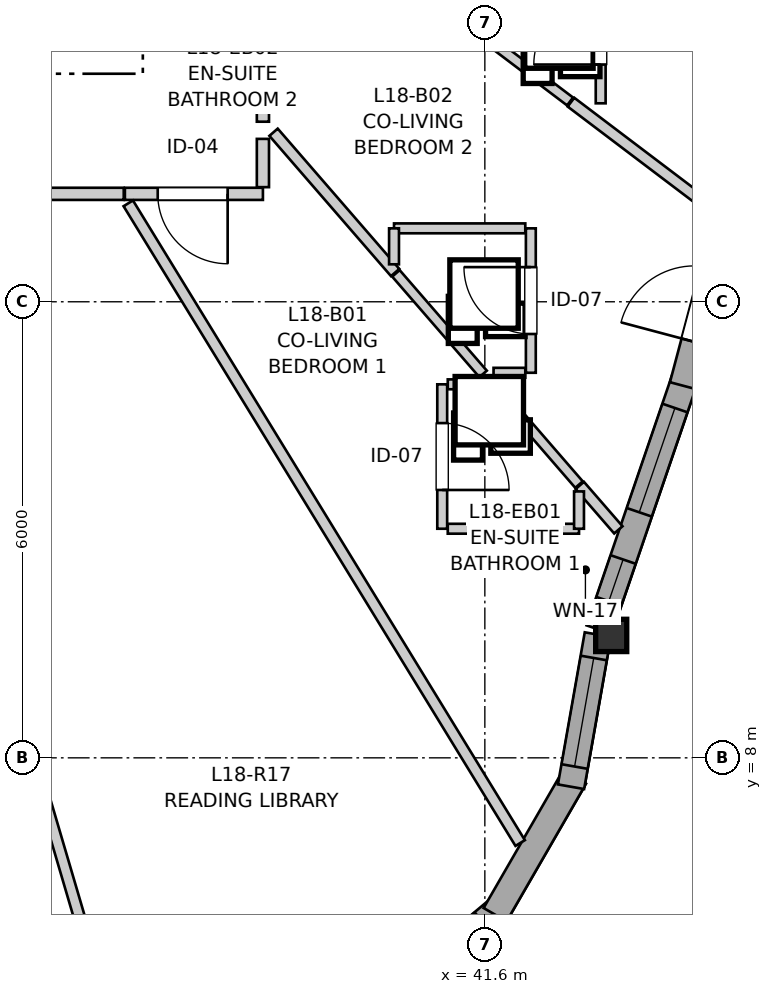
"""IFC4 building model, lengths in metres.
Left out: names, types, materials, properties, quantities, classifications, styles, units other than length and angle.
Written with IfcOpenShell. Run it as: python <this file> out.ifc"""

import sys

from ifc_helpers import new_model, si_unit, direction, frame, frame_2d, origin, origin_2d, place, context, subcontext, project, spatial, rectangle, i_section, extrude, source, transform, mapped, element, fill, save


model = new_model("IFC4")
c1 = context("Model", 3, precision=1e-05, world=origin(), true_north=direction((0.0, 1.0)))
c2 = subcontext(c1, "Body", "Model", "MODEL_VIEW")
j1 = project(units=[si_unit("LENGTHUNIT", "METRE"), si_unit("PLANEANGLEUNIT", "RADIAN")], contexts=[c1])
p1 = place(None, origin())
s1 = spatial("IfcSite", under=j1, at=p1, CompositionType="ELEMENT")
p2 = place(p1, origin())
s2 = spatial("IfcBuilding", under=s1, at=p2, CompositionType="ELEMENT")
p3 = place(p2, frame((0.0, 0.0, 62.2)))
s3 = spatial("IfcBuildingStorey", under=s2, at=p3, CompositionType="ELEMENT", Elevation=62.2)
m1 = source(origin(), c2, "Body", "SweptSolid", [
    extrude(i_section(OverallWidth=0.409, OverallDepth=0.425, WebThickness=0.03, FlangeThickness=0.048, FilletRadius=0.015, at=origin_2d()), origin(), (0.0, 0.0, 1.0), 2.9),
])
p4 = place(p3, frame((43.262, 9.611, 0.0), z_axis=(0.0, 0.0, 1.0), x_axis=(1.0, 0.0, 0.0)))
e1 = element("IfcColumn", 1, at=p4, inside=s3, PredefinedType="PILASTER", context=c2, shape_type="MappedRepresentation", body=[
    mapped(m1, transform((0.0, 0.0, 0.0), x_axis=(1.0, 0.0, 0.0), y_axis=(0.0, 1.0, 0.0), z_axis=(0.0, 0.0, 1.0), scale=1.0)),
])
p5 = place(p3, frame((40.221, 4.697, 0.0), z_axis=(0.0, 0.0, 1.0), x_axis=(0.766024572719, 0.642811289563, 0.0)))
e2 = element("IfcWall", 2, at=p5, inside=s3, PredefinedType="SOLIDWALL", context=c2, shape_type="SweptSolid", body=[
    extrude(rectangle(XDim=2.09, YDim=0.35, at=frame_2d((1.045, 0.0))), origin(), (0.0, 0.0, 1.0), 2.38),
])
p6 = place(p5, frame((0.32, 0.0, 0.82)))
e3 = element("IfcOpeningElement", 3, at=p6, cuts=e2, PredefinedType="OPENING", context=c2, shape_type="SweptSolid", body=[
    extrude(rectangle(XDim=1.45, YDim=1.25, at=frame_2d((0.725, 0.625))), frame((0.0, 0.185, 0.0), z_axis=(0.0, -1.0, 0.0), x_axis=(1.0, 0.0, 0.0)), (0.0, 0.0, 1.0), 0.37),
])
p7 = place(p3, frame((41.735, 5.937, 0.0), z_axis=(0.0, 0.0, 1.0), x_axis=(0.49990781971, 0.866078617559, 0.0)))
e4 = element("IfcWall", 4, at=p7, inside=s3, PredefinedType="SOLIDWALL", context=c2, shape_type="SweptSolid", body=[
    extrude(rectangle(XDim=2.09, YDim=0.35, at=frame_2d((1.045, 0.0))), origin(), (0.0, 0.0, 1.0), 2.38),
])
p8 = place(p3, frame((42.734, 7.62, 0.0), z_axis=(0.0, 0.0, 1.0), x_axis=(0.173607131876, 0.984814989611, 0.0)))
e5 = element("IfcWall", 5, at=p8, inside=s3, PredefinedType="SOLIDWALL", context=c2, shape_type="SweptSolid", body=[
    extrude(rectangle(XDim=2.032, YDim=0.35, at=frame_2d((1.016, 0.0))), origin(), (0.0, 0.0, 1.0), 2.38),
])
p9 = place(p8, frame((0.27, 0.0, 0.82)))
e6 = element("IfcOpeningElement", 6, at=p9, cuts=e5, PredefinedType="OPENING", context=c2, shape_type="SweptSolid", body=[
    extrude(rectangle(XDim=1.45, YDim=1.25, at=frame_2d((0.725, 0.625))), frame((0.0, 0.185, 0.0), z_axis=(0.0, -1.0, 0.0), x_axis=(1.0, 0.0, 0.0)), (0.0, 0.0, 1.0), 0.37),
])
p10 = place(p3, frame((43.104, 9.686, 0.0), z_axis=(0.0, 0.0, 1.0), x_axis=(0.323558843572, 0.946208050455, 0.0)))
e7 = element("IfcWall", 7, at=p10, inside=s3, PredefinedType="SOLIDWALL", context=c2, shape_type="SweptSolid", body=[
    extrude(rectangle(XDim=3.482, YDim=0.35, at=frame_2d((1.741, 0.0))), origin(), (0.0, 0.0, 1.0), 2.38),
])
p11 = place(p10, frame((0.396, 0.0, 0.82)))
e8 = element("IfcOpeningElement", 8, at=p11, cuts=e7, PredefinedType="OPENING", context=c2, shape_type="SweptSolid", body=[
    extrude(rectangle(XDim=0.58, YDim=1.35, at=frame_2d((0.29, 0.675))), frame((0.0, 0.185, 0.0), z_axis=(0.0, -1.0, 0.0), x_axis=(1.0, 0.0, 0.0)), (0.0, 0.0, 1.0), 0.37),
])
p12 = place(p10, frame((1.632, 0.0, 0.82)))
e9 = element("IfcOpeningElement", 9, at=p12, cuts=e7, PredefinedType="OPENING", context=c2, shape_type="SweptSolid", body=[
    extrude(rectangle(XDim=1.45, YDim=1.25, at=frame_2d((0.725, 0.625))), frame((0.0, 0.185, 0.0), z_axis=(0.0, -1.0, 0.0), x_axis=(1.0, 0.0, 0.0)), (0.0, 0.0, 1.0), 0.37),
])
p13 = place(p3, frame((44.205, 12.897, 0.0), z_axis=(0.0, 0.0, 1.0), x_axis=(0.257099428233, 0.966384956424, 0.0)))
e10 = element("IfcWall", 10, at=p13, inside=s3, PredefinedType="SOLIDWALL", context=c2, shape_type="SweptSolid", body=[
    extrude(rectangle(XDim=3.13, YDim=0.35, at=frame_2d((1.565, 0.0))), origin(), (0.0, 0.0, 1.0), 2.38),
])
p14 = place(p13, frame((0.595, 0.0, 0.0)))
e11 = element("IfcOpeningElement", 11, at=p14, cuts=e10, PredefinedType="OPENING", context=c2, shape_type="SweptSolid", body=[
    extrude(rectangle(XDim=1.0, YDim=2.1, at=frame_2d((0.5, 1.05))), frame((0.0, 0.185, 0.0), z_axis=(0.0, -1.0, 0.0), x_axis=(1.0, 0.0, 0.0)), (0.0, 0.0, 1.0), 0.37),
])
p15 = place(p3, frame((36.849, 15.42, 0.0), z_axis=(0.0, 0.0, 1.0), x_axis=(-1.0, 0.0, 0.0)))
e12 = element("IfcWall", 12, at=p15, inside=s3, PredefinedType="PARTITIONING", context=c2, shape_type="SweptSolid", body=[
    extrude(rectangle(XDim=3.401, YDim=0.16, at=frame_2d((1.701, 0.0))), origin(), (0.0, 0.0, 1.0), 2.9),
])
p16 = place(p15, frame((1.221, 0.0, 0.0)))
e13 = element("IfcOpeningElement", 13, at=p16, cuts=e12, PredefinedType="OPENING", context=c2, shape_type="SweptSolid", body=[
    extrude(rectangle(XDim=0.96, YDim=2.1, at=frame_2d((0.48, 1.05))), frame((0.0, 0.09, 0.0), z_axis=(0.0, -1.0, 0.0), x_axis=(1.0, 0.0, 0.0)), (0.0, 0.0, 1.0), 0.18),
])
p17 = place(p3, frame((38.68, 19.713, 0.0), z_axis=(0.0, 0.0, 1.0), x_axis=(0.0, -1.0, 0.0)))
e14 = element("IfcWall", 14, at=p17, inside=s3, PredefinedType="PARTITIONING", context=c2, shape_type="SweptSolid", body=[
    extrude(rectangle(XDim=3.344, YDim=0.16, at=frame_2d((1.672, 0.0))), origin(), (0.0, 0.0, 1.0), 2.9),
])
p18 = place(p17, frame((1.21, 0.0, 0.0)))
e15 = element("IfcOpeningElement", 15, at=p18, cuts=e14, PredefinedType="OPENING", context=c2, shape_type="SweptSolid", body=[
    extrude(rectangle(XDim=0.92, YDim=2.1, at=frame_2d((0.46, 1.05))), frame((0.0, 0.09, 0.0), z_axis=(0.0, -1.0, 0.0), x_axis=(1.0, 0.0, 0.0)), (0.0, 0.0, 1.0), 0.18),
])
p19 = place(p3, frame((41.039, 12.914, 0.0), z_axis=(0.0, 0.0, 1.0), x_axis=(0.0, -1.0, 0.0)))
e16 = element("IfcWall", 16, at=p19, inside=s3, PredefinedType="PARTITIONING", context=c2, shape_type="SweptSolid", body=[
    extrude(rectangle(XDim=1.9, YDim=0.13, at=frame_2d((0.95, 0.0))), origin(), (0.0, 0.0, 1.0), 2.9),
])
p20 = place(p19, frame((0.51, 0.0, 0.0)))
e17 = element("IfcOpeningElement", 17, at=p20, cuts=e16, PredefinedType="OPENING", context=c2, shape_type="SweptSolid", body=[
    extrude(rectangle(XDim=0.88, YDim=2.05, at=frame_2d((0.44, 1.025))), frame((0.0, 0.075, 0.0), z_axis=(0.0, -1.0, 0.0), x_axis=(1.0, 0.0, 0.0)), (0.0, 0.0, 1.0), 0.15),
])
p21 = place(p3, frame((42.205, 13.066, 0.0), z_axis=(0.0, 0.0, 1.0), x_axis=(0.0, 1.0, 0.0)))
e18 = element("IfcWall", 18, at=p21, inside=s3, PredefinedType="PARTITIONING", context=c2, shape_type="SweptSolid", body=[
    extrude(rectangle(XDim=1.9, YDim=0.13, at=frame_2d((0.95, 0.0))), origin(), (0.0, 0.0, 1.0), 2.9),
])
p22 = place(p21, frame((0.51, 0.0, 0.0)))
e19 = element("IfcOpeningElement", 19, at=p22, cuts=e18, PredefinedType="OPENING", context=c2, shape_type="SweptSolid", body=[
    extrude(rectangle(XDim=0.88, YDim=2.05, at=frame_2d((0.44, 1.025))), frame((0.0, 0.075, 0.0), z_axis=(0.0, -1.0, 0.0), x_axis=(1.0, 0.0, 0.0)), (0.0, 0.0, 1.0), 0.15),
])
p23 = place(p3, frame((43.124, 16.611, 0.0), z_axis=(0.0, 0.0, 1.0), x_axis=(0.0, 1.0, 0.0)))
e20 = element("IfcWall", 20, at=p23, inside=s3, PredefinedType="PARTITIONING", context=c2, shape_type="SweptSolid", body=[
    extrude(rectangle(XDim=1.9, YDim=0.13, at=frame_2d((0.95, 0.0))), origin(), (0.0, 0.0, 1.0), 2.9),
])
p24 = place(p23, frame((0.51, 0.0, 0.0)))
e21 = element("IfcOpeningElement", 21, at=p24, cuts=e20, PredefinedType="OPENING", context=c2, shape_type="SweptSolid", body=[
    extrude(rectangle(XDim=0.88, YDim=2.05, at=frame_2d((0.44, 1.025))), frame((0.0, 0.075, 0.0), z_axis=(0.0, -1.0, 0.0), x_axis=(1.0, 0.0, 0.0)), (0.0, 0.0, 1.0), 0.15),
])
p25 = place(p3, frame((38.68, 15.42, 0.0), z_axis=(0.0, 0.0, 1.0), x_axis=(-1.0, 0.0, 0.0)))
e22 = element("IfcWall", 22, at=p25, inside=s3, PredefinedType="PARTITIONING", context=c2, shape_type="SweptSolid", body=[
    extrude(rectangle(XDim=1.816, YDim=0.16, at=frame_2d((0.908, 0.0))), origin(), (0.0, 0.0, 1.0), 2.9),
])
p26 = place(p25, frame((0.464, 0.0, 0.0)))
e23 = element("IfcOpeningElement", 23, at=p26, cuts=e22, PredefinedType="OPENING", context=c2, shape_type="SweptSolid", body=[
    extrude(rectangle(XDim=0.92, YDim=2.1, at=frame_2d((0.46, 1.05))), frame((0.0, 0.09, 0.0), z_axis=(0.0, -1.0, 0.0), x_axis=(1.0, 0.0, 0.0)), (0.0, 0.0, 1.0), 0.18),
])
p27 = place(p3, frame((33.496, 15.312, 0.0), z_axis=(0.0, 0.0, 1.0), x_axis=(0.282353610079, -0.959310397564, 0.0)))
e24 = element("IfcWall", 24, at=p27, inside=s3, PredefinedType="PARTITIONING", context=c2, shape_type="SweptSolid", body=[
    extrude(rectangle(XDim=11.503, YDim=0.145, at=frame_2d((5.752, 0.0))), origin(), (0.0, 0.0, 1.0), 2.9),
])
p28 = place(p3, frame((36.908, 15.295, 0.0), z_axis=(0.0, 0.0, 1.0), x_axis=(0.522407183079, -0.852696156358, 0.0)))
e25 = element("IfcWall", 25, at=p28, inside=s3, PredefinedType="PARTITIONING", context=c2, shape_type="SweptSolid", body=[
    extrude(rectangle(XDim=9.87, YDim=0.145, at=frame_2d((4.935, 0.0))), origin(), (0.0, 0.0, 1.0), 2.9),
])
p29 = place(p3, frame((38.82, 16.23, 0.0), z_axis=(0.0, 0.0, 1.0), x_axis=(0.655037088123, -0.755596726556, 0.0)))
e26 = element("IfcWall", 26, at=p29, inside=s3, PredefinedType="PARTITIONING", context=c2, shape_type="SweptSolid", body=[
    extrude(rectangle(XDim=2.442, YDim=0.145, at=frame_2d((1.221, 0.0))), origin(), (0.0, 0.0, 1.0), 2.9),
])
p30 = place(p3, frame((42.733, 16.626, 0.0), z_axis=(0.0, 0.0, 1.0), x_axis=(0.797372907097, -0.603486907089, 0.0)))
e27 = element("IfcWall", 27, at=p30, inside=s3, PredefinedType="PARTITIONING", context=c2, shape_type="SweptSolid", body=[
    extrude(rectangle(XDim=2.371, YDim=0.145, at=frame_2d((1.186, 0.0))), origin(), (0.0, 0.0, 1.0), 2.9),
])
for number, where, z_axis, x_axis in (
    (28, (41.112, 11.014, 0.0), (0.0, 0.0, 1.0), (1.0, 0.0, 0.0)),
    (29, (40.405, 14.966, 0.0), (0.0, 0.0, 1.0), (1.0, 0.0, 0.0)),
):
    element("IfcWall", number, at=place(p3, frame(where, z_axis=z_axis, x_axis=x_axis)), inside=s3, PredefinedType="PARTITIONING", context=c2, shape_type="SweptSolid", body=[
        extrude(rectangle(XDim=1.727, YDim=0.13, at=frame_2d((0.864, 0.0))), origin(), (0.0, 0.0, 1.0), 2.9),
    ])
p31 = place(p3, frame((40.43, 14.374, 0.0), z_axis=(0.0, 0.0, 1.0), x_axis=(0.655121637619, -0.755523421162, 0.0)))
e30 = element("IfcWall", 30, at=p31, inside=s3, PredefinedType="PARTITIONING", context=c2, shape_type="SweptSolid", body=[
    extrude(rectangle(XDim=1.751, YDim=0.13, at=frame_2d((0.875, 0.0))), origin(), (0.0, 0.0, 1.0), 2.9),
])
p32 = place(p3, frame((41.696, 12.914, 0.0), z_axis=(0.0, 0.0, 1.0), x_axis=(0.654882611276, -0.755730616985, 0.0)))
e31 = element("IfcWall", 31, at=p32, inside=s3, PredefinedType="PARTITIONING", context=c2, shape_type="SweptSolid", body=[
    extrude(rectangle(XDim=1.745, YDim=0.13, at=frame_2d((0.873, 0.0))), origin(), (0.0, 0.0, 1.0), 2.9),
])
p33 = place(p3, frame((41.351, 17.672, 0.0), z_axis=(0.0, 0.0, 1.0), x_axis=(0.797400841938, -0.603449995672, 0.0)))
e32 = element("IfcWall", 32, at=p33, inside=s3, PredefinedType="PARTITIONING", context=c2, shape_type="SweptSolid", body=[
    extrude(rectangle(XDim=1.718, YDim=0.13, at=frame_2d((0.859, 0.0))), origin(), (0.0, 0.0, 1.0), 2.9),
])
p34 = place(p3, frame((38.68, 15.508, 0.0), z_axis=(0.0, 0.0, 1.0), x_axis=(0.0, 1.0, 0.0)))
e33 = element("IfcWall", 33, at=p34, inside=s3, PredefinedType="PARTITIONING", context=c2, shape_type="SweptSolid", body=[
    extrude(rectangle(XDim=0.635, YDim=0.16, at=frame_2d((0.317, 0.0))), origin(), (0.0, 0.0, 1.0), 2.9),
])
p35 = place(p3, frame((42.849, 11.584, 0.0), z_axis=(0.0, 0.0, 1.0), x_axis=(0.655530542193, -0.755168662123, 0.0)))
e34 = element("IfcWall", 34, at=p35, inside=s3, PredefinedType="PARTITIONING", context=c2, shape_type="SweptSolid", body=[
    extrude(rectangle(XDim=0.774, YDim=0.145, at=frame_2d((0.387, 0.0))), origin(), (0.0, 0.0, 1.0), 2.9),
])
p36 = place(p3, frame((41.112, 12.914, 0.0), z_axis=(0.0, 0.0, 1.0), x_axis=(1.0, 0.0, 0.0)))
e35 = element("IfcWall", 35, at=p36, inside=s3, PredefinedType="PARTITIONING", context=c2, shape_type="SweptSolid", body=[
    extrude(rectangle(XDim=0.434, YDim=0.13, at=frame_2d((0.217, 0.0))), origin(), (0.0, 0.0, 1.0), 2.9),
])
p37 = place(p3, frame((41.714, 13.066, 0.0), z_axis=(0.0, 0.0, 1.0), x_axis=(1.0, 0.0, 0.0)))
e36 = element("IfcWall", 36, at=p37, inside=s3, PredefinedType="PARTITIONING", context=c2, shape_type="SweptSolid", body=[
    extrude(rectangle(XDim=0.418, YDim=0.13, at=frame_2d((0.209, 0.0))), origin(), (0.0, 0.0, 1.0), 2.9),
])
p38 = place(p3, frame((42.839, 11.014, 0.0), z_axis=(0.0, 0.0, 1.0), x_axis=(0.0, 1.0, 0.0)))
e37 = element("IfcWall", 37, at=p38, inside=s3, PredefinedType="PARTITIONING", context=c2, shape_type="SweptSolid", body=[
    extrude(rectangle(XDim=0.491, YDim=0.13, at=frame_2d((0.246, 0.0))), origin(), (0.0, 0.0, 1.0), 2.9),
])
p39 = place(p3, frame((40.405, 14.493, 0.0), z_axis=(0.0, 0.0, 1.0), x_axis=(0.0, 1.0, 0.0)))
e38 = element("IfcWall", 38, at=p39, inside=s3, PredefinedType="PARTITIONING", context=c2, shape_type="SweptSolid", body=[
    extrude(rectangle(XDim=0.473, YDim=0.13, at=frame_2d((0.237, 0.0))), origin(), (0.0, 0.0, 1.0), 2.9),
])
m2 = source(origin(), c2, "Body", "SweptSolid", [
    extrude(rectangle(XDim=1.45, YDim=1.25, at=frame_2d((0.725, 0.625))), frame((0.0, 0.03, 0.0), z_axis=(0.0, -1.0, 0.0), x_axis=(1.0, 0.0, 0.0)), (0.0, 0.0, 1.0), 0.06),
])
p40 = place(p9, origin())
e39 = element("IfcWindow", 39, at=p40, inside=s3, PartitioningType="SINGLE_PANEL", PredefinedType="WINDOW", context=c2, shape_type="MappedRepresentation", body=[
    mapped(m2, transform((0.0, 0.0, 0.0), x_axis=(1.0, 0.0, 0.0), y_axis=(0.0, 1.0, 0.0), z_axis=(0.0, 0.0, 1.0), scale=1.0)),
])
fill(e6, e39)
m3 = source(origin(), c2, "Body", "SweptSolid", [
    extrude(rectangle(XDim=0.58, YDim=1.35, at=frame_2d((0.29, 0.675))), frame((0.0, 0.03, 0.0), z_axis=(0.0, -1.0, 0.0), x_axis=(1.0, 0.0, 0.0)), (0.0, 0.0, 1.0), 0.06),
])
p41 = place(p11, origin())
e40 = element("IfcWindow", 40, at=p41, inside=s3, PartitioningType="SINGLE_PANEL", PredefinedType="WINDOW", context=c2, shape_type="MappedRepresentation", body=[
    mapped(m3, transform((0.0, 0.0, 0.0), x_axis=(1.0, 0.0, 0.0), y_axis=(0.0, 1.0, 0.0), z_axis=(0.0, 0.0, 1.0), scale=1.0)),
])
fill(e8, e40)
p42 = place(p12, origin())
e41 = element("IfcWindow", 41, at=p42, inside=s3, PartitioningType="SINGLE_PANEL", PredefinedType="WINDOW", context=c2, shape_type="MappedRepresentation", body=[
    mapped(m2, transform((0.0, 0.0, 0.0), x_axis=(1.0, 0.0, 0.0), y_axis=(0.0, 1.0, 0.0), z_axis=(0.0, 0.0, 1.0), scale=1.0)),
])
fill(e9, e41)
m4 = source(origin(), c2, "Body", "SweptSolid", [
    extrude(rectangle(XDim=0.88, YDim=2.05, at=frame_2d((0.44, 1.025))), frame((0.0, 0.025, 0.0), z_axis=(0.0, -1.0, 0.0), x_axis=(1.0, 0.0, 0.0)), (0.0, 0.0, 1.0), 0.05),
])
p43 = place(p20, origin())
e42 = element("IfcDoor", 42, at=p43, inside=s3, OperationType="SINGLE_SWING_RIGHT", PredefinedType="DOOR", context=c2, shape_type="MappedRepresentation", body=[
    mapped(m4, transform((0.0, 0.0, 0.0), x_axis=(1.0, 0.0, 0.0), y_axis=(0.0, 1.0, 0.0), z_axis=(0.0, 0.0, 1.0), scale=1.0)),
])
fill(e17, e42)
p44 = place(p22, origin())
e43 = element("IfcDoor", 43, at=p44, inside=s3, OperationType="SINGLE_SWING_RIGHT", PredefinedType="DOOR", context=c2, shape_type="MappedRepresentation", body=[
    mapped(m4, transform((0.0, 0.0, 0.0), x_axis=(1.0, 0.0, 0.0), y_axis=(0.0, 1.0, 0.0), z_axis=(0.0, 0.0, 1.0), scale=1.0)),
])
fill(e19, e43)
p45 = place(p24, origin())
e44 = element("IfcDoor", 44, at=p45, inside=s3, OperationType="SINGLE_SWING_LEFT", PredefinedType="DOOR", context=c2, shape_type="MappedRepresentation", body=[
    mapped(m4, transform((0.0, 0.0, 0.0), x_axis=(1.0, 0.0, 0.0), y_axis=(0.0, 1.0, 0.0), z_axis=(0.0, 0.0, 1.0), scale=1.0)),
])
fill(e21, e44)
m5 = source(origin(), c2, "Body", "SweptSolid", [
    extrude(rectangle(XDim=0.92, YDim=2.1, at=frame_2d((0.46, 1.05))), frame((0.0, 0.025, 0.0), z_axis=(0.0, -1.0, 0.0), x_axis=(1.0, 0.0, 0.0)), (0.0, 0.0, 1.0), 0.05),
])
p46 = place(p26, origin())
e45 = element("IfcDoor", 45, at=p46, inside=s3, OperationType="SINGLE_SWING_LEFT", PredefinedType="DOOR", context=c2, shape_type="MappedRepresentation", body=[
    mapped(m5, transform((0.0, 0.0, 0.0), x_axis=(1.0, 0.0, 0.0), y_axis=(0.0, 1.0, 0.0), z_axis=(0.0, 0.0, 1.0), scale=1.0)),
])
fill(e23, e45)
save(model, sys.argv[1])
